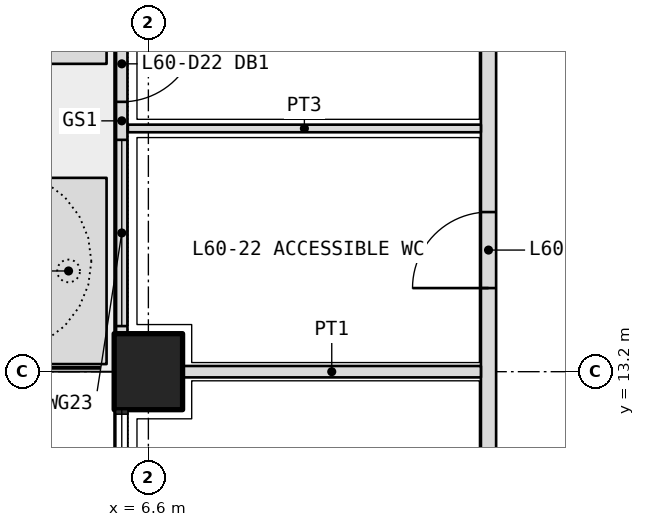
"""IFC4 building model, lengths in metres.
Left out: names, types, materials, properties, quantities, classifications, styles, units other than length and angle.
Written with IfcOpenShell. Run it as: python <this file> out.ifc"""

import sys

from ifc_helpers import new_model, si_unit, direction, frame, frame_2d, origin, origin_2d, place, context, subcontext, project, spatial, polyline, rectangle, outline, extrude, element, fill, save


model = new_model("IFC4")
c1 = context("Model", 3, precision=1e-05, world=origin(), true_north=direction((0.0, 1.0)))
c2 = subcontext(c1, "Body", "Model", "MODEL_VIEW")
j1 = project(units=[si_unit("LENGTHUNIT", "METRE"), si_unit("PLANEANGLEUNIT", "RADIAN")], contexts=[c1])
p1 = place(None, origin())
s1 = spatial("IfcSite", under=j1, at=p1, CompositionType="ELEMENT")
p2 = place(p1, origin())
s2 = spatial("IfcBuilding", under=s1, at=p2, CompositionType="ELEMENT")
p3 = place(p2, frame((0.0, 0.0, 262.8)))
s3 = spatial("IfcBuildingStorey", under=s2, at=p3, CompositionType="ELEMENT", Elevation=262.8)
p4 = place(p3, frame((6.6, 13.2, 0.0), z_axis=(0.0, 0.0, 1.0), x_axis=(0.0, 1.0, 0.0)))
e1 = element("IfcColumn", 1, at=p4, inside=s3, PredefinedType="COLUMN", context=c2, shape_type="SweptSolid", body=[
    extrude(rectangle(XDim=1.0, YDim=0.9, at=origin_2d()), origin(), (0.0, 0.0, 1.0), 4.2),
])
p5 = place(p3, origin())
e2 = element("IfcWall", 2, at=p5, inside=s3, PredefinedType="USERDEFINED", context=c2, shape_type="SweptSolid", body=[
    extrude(outline(polyline([(5.05, 13.3), (6.05, 13.3), (6.05, 15.75), (5.05, 15.75), (5.05, 13.3)]), holes=[polyline([(5.2, 13.45), (5.9, 13.45), (5.9, 15.6), (5.2, 15.6), (5.2, 13.45)])]), origin(), (0.0, 0.0, 1.0), 1.05),
])
p6 = place(p3, origin())
e3 = element("IfcWall", 3, at=p6, inside=s3, PredefinedType="USERDEFINED", context=c2, shape_type="SweptSolid", body=[
    extrude(outline(polyline([(5.05, 17.25), (6.05, 17.25), (6.05, 26.3), (5.05, 26.3), (5.05, 17.25)]), holes=[polyline([(5.2, 17.4), (5.9, 17.4), (5.9, 26.15), (5.2, 26.15), (5.2, 17.4)])]), origin(), (0.0, 0.0, 1.0), 1.05),
])
p7 = place(p3, frame((6.25, 19.3, 0.0), z_axis=(0.0, 0.0, 1.0), x_axis=(0.0, -1.0, 0.0)))
e4 = element("IfcWall", 4, at=p7, inside=s3, PredefinedType="SOLIDWALL", context=c2, shape_type="SweptSolid", body=[
    extrude(rectangle(XDim=5.6, YDim=0.15, at=frame_2d((2.8, 0.0))), origin(), (0.0, 0.0, 1.0), 2.7),
])
p8 = place(p7, frame((1.55, 0.0, 0.0)))
e5 = element("IfcOpeningElement", 5, at=p8, cuts=e4, PredefinedType="OPENING", context=c2, shape_type="SweptSolid", body=[
    extrude(rectangle(XDim=1.0, YDim=2.4, at=frame_2d((0.5, 1.2))), frame((0.0, 0.085, 0.0), z_axis=(0.0, -1.0, 0.0), x_axis=(1.0, 0.0, 0.0)), (0.0, 0.0, 1.0), 0.17),
])
p9 = place(p7, frame((0.1, 0.0, 0.1)))
e6 = element("IfcOpeningElement", 6, at=p9, cuts=e4, PredefinedType="OPENING", context=c2, shape_type="SweptSolid", body=[
    extrude(rectangle(XDim=1.35, YDim=2.3, at=frame_2d((0.675, 1.15))), frame((0.0, 0.085, 0.0), z_axis=(0.0, -1.0, 0.0), x_axis=(1.0, 0.0, 0.0)), (0.0, 0.0, 1.0), 0.17),
])
p10 = place(p7, frame((3.05, 0.0, 0.1)))
e7 = element("IfcOpeningElement", 7, at=p10, cuts=e4, PredefinedType="OPENING", context=c2, shape_type="SweptSolid", body=[
    extrude(rectangle(XDim=2.45, YDim=2.3, at=frame_2d((1.225, 1.15))), frame((0.0, 0.085, 0.0), z_axis=(0.0, -1.0, 0.0), x_axis=(1.0, 0.0, 0.0)), (0.0, 0.0, 1.0), 0.17),
])
p11 = place(p3, frame((11.075, 7.4, 0.0), z_axis=(0.0, 0.0, 1.0), x_axis=(0.0, 1.0, 0.0)))
e8 = element("IfcWall", 8, at=p11, inside=s3, PredefinedType="PARTITIONING", context=c2, shape_type="SweptSolid", body=[
    extrude(rectangle(XDim=31.4, YDim=0.2, at=frame_2d((15.7, 0.0))), origin(), (0.0, 0.0, 1.0), 3.0),
])
p12 = place(p11, frame((2.25, 0.0, 0.0)))
e9 = element("IfcOpeningElement", 9, at=p12, cuts=e8, PredefinedType="OPENING", context=c2, shape_type="SweptSolid", body=[
    extrude(rectangle(XDim=1.2, YDim=2.1, at=frame_2d((0.6, 1.05))), frame((0.0, 0.11, 0.0), z_axis=(0.0, -1.0, 0.0), x_axis=(1.0, 0.0, 0.0)), (0.0, 0.0, 1.0), 0.22),
])
p13 = place(p11, frame((6.9, 0.0, 0.0)))
e10 = element("IfcOpeningElement", 10, at=p13, cuts=e8, PredefinedType="OPENING", context=c2, shape_type="SweptSolid", body=[
    extrude(rectangle(XDim=1.0, YDim=2.1, at=frame_2d((0.5, 1.05))), frame((0.0, 0.11, 0.0), z_axis=(0.0, -1.0, 0.0), x_axis=(1.0, 0.0, 0.0)), (0.0, 0.0, 1.0), 0.22),
])
p14 = place(p11, frame((10.35, 0.0, 0.0)))
e11 = element("IfcOpeningElement", 11, at=p14, cuts=e8, PredefinedType="OPENING", context=c2, shape_type="SweptSolid", body=[
    extrude(rectangle(XDim=0.9, YDim=2.1, at=frame_2d((0.45, 1.05))), frame((0.0, 0.11, 0.0), z_axis=(0.0, -1.0, 0.0), x_axis=(1.0, 0.0, 0.0)), (0.0, 0.0, 1.0), 0.22),
])
p15 = place(p11, frame((13.7, 0.0, 0.0)))
e12 = element("IfcOpeningElement", 12, at=p15, cuts=e8, PredefinedType="OPENING", context=c2, shape_type="SweptSolid", body=[
    extrude(rectangle(XDim=0.9, YDim=2.1, at=frame_2d((0.45, 1.05))), frame((0.0, 0.11, 0.0), z_axis=(0.0, -1.0, 0.0), x_axis=(1.0, 0.0, 0.0)), (0.0, 0.0, 1.0), 0.22),
])
p16 = place(p11, frame((16.85, 0.0, 0.0)))
e13 = element("IfcOpeningElement", 13, at=p16, cuts=e8, PredefinedType="OPENING", context=c2, shape_type="SweptSolid", body=[
    extrude(rectangle(XDim=1.0, YDim=2.1, at=frame_2d((0.5, 1.05))), frame((0.0, 0.11, 0.0), z_axis=(0.0, -1.0, 0.0), x_axis=(1.0, 0.0, 0.0)), (0.0, 0.0, 1.0), 0.22),
])
p17 = place(p11, frame((24.75, 0.0, 0.0)))
e14 = element("IfcOpeningElement", 14, at=p17, cuts=e8, PredefinedType="OPENING", context=c2, shape_type="SweptSolid", body=[
    extrude(rectangle(XDim=1.0, YDim=2.1, at=frame_2d((0.5, 1.05))), frame((0.0, 0.11, 0.0), z_axis=(0.0, -1.0, 0.0), x_axis=(1.0, 0.0, 0.0)), (0.0, 0.0, 1.0), 0.22),
])
p18 = place(p3, frame((6.33, 16.4, 0.0), z_axis=(0.0, 0.0, 1.0), x_axis=(1.0, 0.0, 0.0)))
e15 = element("IfcWall", 15, at=p18, inside=s3, PredefinedType="PARTITIONING", context=c2, shape_type="SweptSolid", body=[
    extrude(rectangle(XDim=4.645, YDim=0.1, at=frame_2d((2.323, 0.0))), origin(), (0.0, 0.0, 1.0), 2.7),
])
p19 = place(p3, frame((7.05, 13.2, 0.0), z_axis=(0.0, 0.0, 1.0), x_axis=(1.0, 0.0, 0.0)))
e16 = element("IfcWall", 16, at=p19, inside=s3, PredefinedType="PARTITIONING", context=c2, shape_type="SweptSolid", body=[
    extrude(rectangle(XDim=3.925, YDim=0.15, at=frame_2d((1.962, 0.0))), origin(), (0.0, 0.0, 1.0), 3.0),
])
p20 = place(p8, origin())
e17 = element("IfcDoor", 17, at=p20, inside=s3, OperationType="SINGLE_SWING_LEFT", PredefinedType="DOOR", context=c2, shape_type="SweptSolid", body=[
    extrude(rectangle(XDim=1.0, YDim=2.4, at=frame_2d((0.5, 1.2))), frame((0.0, 0.025, 0.0), z_axis=(0.0, -1.0, 0.0), x_axis=(1.0, 0.0, 0.0)), (0.0, 0.0, 1.0), 0.05),
])
fill(e5, e17)
p21 = place(p10, origin())
e18 = element("IfcWindow", 18, at=p21, inside=s3, PartitioningType="SINGLE_PANEL", PredefinedType="WINDOW", context=c2, shape_type="SweptSolid", body=[
    extrude(rectangle(XDim=2.45, YDim=2.3, at=frame_2d((1.225, 1.15))), frame((0.0, 0.03, 0.0), z_axis=(0.0, -1.0, 0.0), x_axis=(1.0, 0.0, 0.0)), (0.0, 0.0, 1.0), 0.06),
])
fill(e7, e18)
p22 = place(p13, origin())
e19 = element("IfcDoor", 19, at=p22, inside=s3, OperationType="SINGLE_SWING_LEFT", PredefinedType="DOOR", context=c2, shape_type="SweptSolid", body=[
    extrude(rectangle(XDim=1.0, YDim=2.1, at=frame_2d((0.5, 1.05))), frame((0.0, 0.025, 0.0), z_axis=(0.0, -1.0, 0.0), x_axis=(1.0, 0.0, 0.0)), (0.0, 0.0, 1.0), 0.05),
])
fill(e10, e19)
save(model, sys.argv[1])
